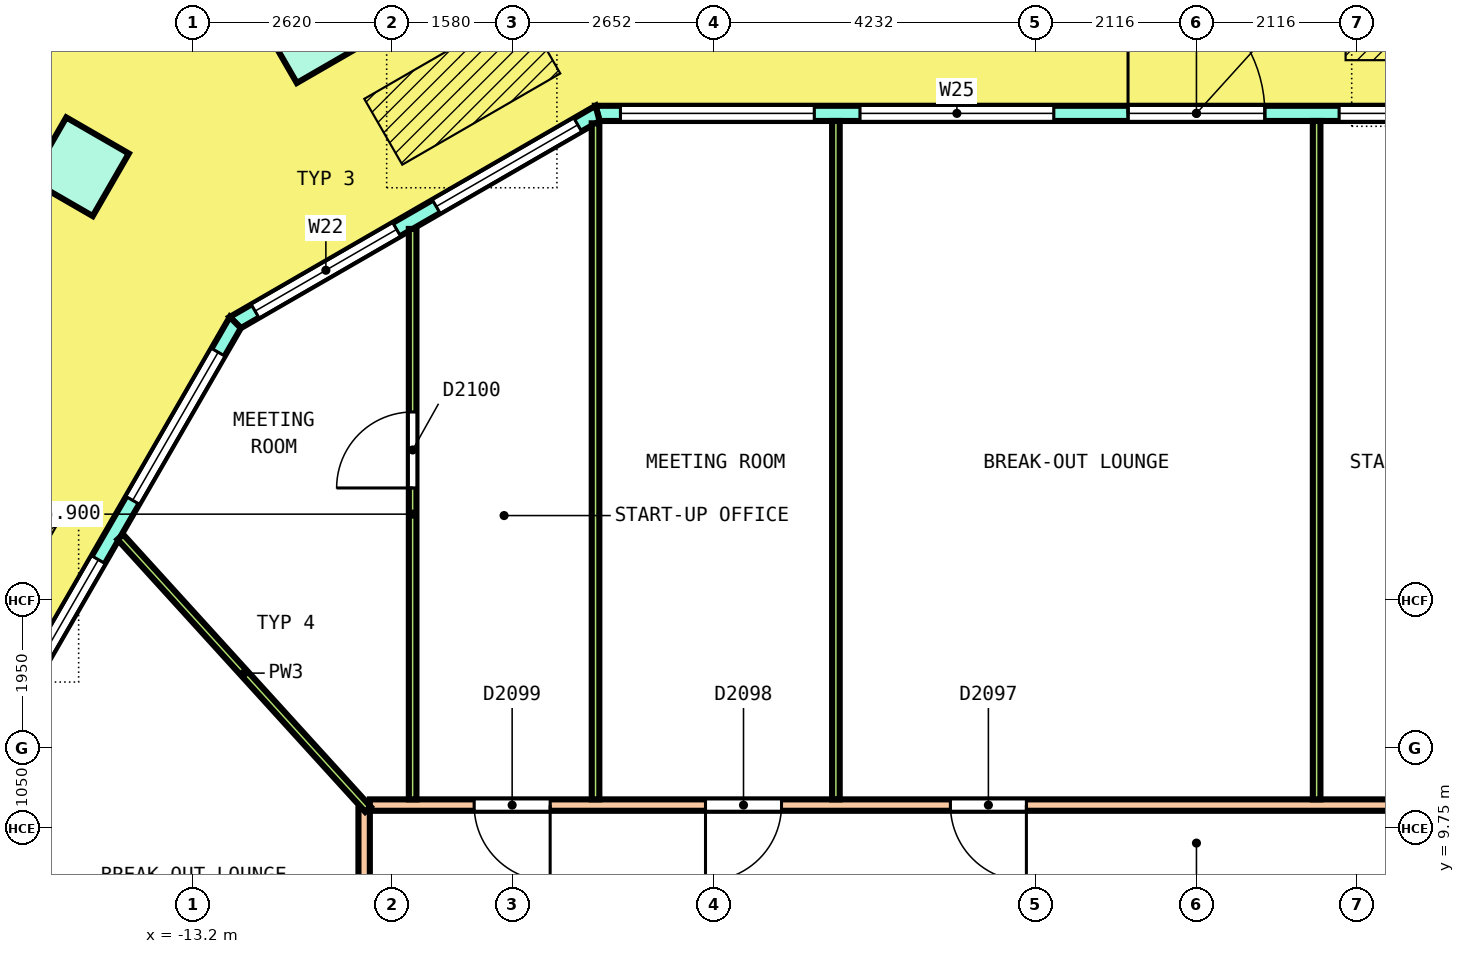
"""IFC4 building model, lengths in metres.
Left out: names, types, materials, properties, quantities, classifications, styles, units other than length and angle.
Written with IfcOpenShell. Run it as: python <this file> out.ifc"""

import sys

from ifc_helpers import new_model, si_unit, direction, frame, frame_2d, origin, origin_2d, place, context, subcontext, project, spatial, polyline, rectangle, outline, extrude, element, fill, save


model = new_model("IFC4")
c1 = context("Model", 3, precision=1e-05, world=origin(), true_north=direction((0.0, 1.0)))
c2 = subcontext(c1, "Body", "Model", "MODEL_VIEW")
j1 = project(units=[si_unit("LENGTHUNIT", "METRE"), si_unit("PLANEANGLEUNIT", "RADIAN")], contexts=[c1])
p1 = place(None, origin())
s1 = spatial("IfcSite", under=j1, at=p1, CompositionType="ELEMENT")
p2 = place(p1, origin())
s2 = spatial("IfcBuilding", under=s1, at=p2, CompositionType="ELEMENT")
p3 = place(p2, frame((0.0, 0.0, 263.0)))
s3 = spatial("IfcBuildingStorey", under=s2, at=p3, CompositionType="ELEMENT", Elevation=263.0)
for number, where, z_axis, x_axis in (
    (1, (-11.662, 20.199, 0.0), (-0.036, 0.0, 0.999), (-0.865, -0.5, -0.031)),
    (2, (-14.695, 18.448, 0.0), (-0.036, 0.0, 0.999), (-0.499, -0.866, -0.018)),
):
    element("IfcColumn", number, at=place(p3, frame(where, z_axis=z_axis, x_axis=x_axis)), inside=s3, PredefinedType="COLUMN", context=c2, shape_type="SweptSolid", body=[
        extrude(rectangle(XDim=0.95, YDim=0.95, at=origin_2d()), origin(), (0.0, 0.0, 1.0), 3.652),
    ])
p4 = place(p3, frame((7.879, 19.15, 0.0), z_axis=(0.0, 0.0, 1.0), x_axis=(-1.0, 0.0, 0.0)))
e3 = element("IfcWall", 3, at=p4, inside=s3, PredefinedType="SOLIDWALL", context=c2, shape_type="SweptSolid", body=[
    extrude(outline(polyline([(-0.027, -0.1), (1.027, -0.1), (2.081, -0.1), (3.135, -0.1), (4.189, -0.1), (5.244, -0.1), (6.298, -0.1), (7.352, -0.1), (8.406, -0.1), (9.46, -0.1), (10.514, -0.1), (11.568, -0.1), (12.622, -0.1), (13.677, -0.1), (14.73, -0.1), (15.785, -0.1), (15.731, 0.1), (14.684, 0.1), (13.637, 0.1), (12.59, 0.1), (11.543, 0.1), (10.496, 0.1), (9.449, 0.1), (8.402, 0.1), (7.355, 0.1), (6.309, 0.1), (5.261, 0.1), (4.215, 0.1), (3.168, 0.1), (2.121, 0.1), (1.074, 0.1), (0.027, 0.1), (-0.027, -0.1)])), origin(), (0.0, 0.0, 1.0), 3.7),
])
p5 = place(p4, frame((0.301, 0.0, 0.1)))
e4 = element("IfcOpeningElement", 4, at=p5, cuts=e3, PredefinedType="OPENING", context=c2, shape_type="SweptSolid", body=[
    extrude(rectangle(XDim=2.55, YDim=2.75, at=frame_2d((1.275, 1.375))), frame((0.0, 0.11, 0.0), z_axis=(0.0, -1.0, 0.0), x_axis=(1.0, 0.0, 0.0)), (0.0, 0.0, 1.0), 0.22),
])
p6 = place(p4, frame((3.452, 0.0, 0.1)))
e5 = element("IfcOpeningElement", 5, at=p6, cuts=e3, PredefinedType="OPENING", context=c2, shape_type="SweptSolid", body=[
    extrude(rectangle(XDim=2.55, YDim=2.75, at=frame_2d((1.275, 1.375))), frame((0.0, 0.11, 0.0), z_axis=(0.0, -1.0, 0.0), x_axis=(1.0, 0.0, 0.0)), (0.0, 0.0, 1.0), 0.22),
])
p7 = place(p4, frame((6.979, 0.0, 0.0)))
e6 = element("IfcOpeningElement", 6, at=p7, cuts=e3, PredefinedType="OPENING", context=c2, shape_type="SweptSolid", body=[
    extrude(rectangle(XDim=1.8, YDim=2.4, at=frame_2d((0.9, 1.2))), frame((0.0, 0.11, 0.0), z_axis=(0.0, -1.0, 0.0), x_axis=(1.0, 0.0, 0.0)), (0.0, 0.0, 1.0), 0.22),
])
p8 = place(p4, frame((6.979, 0.0, 2.55)))
e7 = element("IfcOpeningElement", 7, at=p8, cuts=e3, PredefinedType="OPENING", context=c2, shape_type="SweptSolid", body=[
    extrude(rectangle(XDim=1.8, YDim=0.3, at=frame_2d((0.9, 0.15))), frame((0.0, 0.11, 0.0), z_axis=(0.0, -1.0, 0.0), x_axis=(1.0, 0.0, 0.0)), (0.0, 0.0, 1.0), 0.22),
])
p9 = place(p4, frame((9.755, 0.0, 0.1)))
e8 = element("IfcOpeningElement", 8, at=p9, cuts=e3, PredefinedType="OPENING", context=c2, shape_type="SweptSolid", body=[
    extrude(rectangle(XDim=2.55, YDim=2.75, at=frame_2d((1.275, 1.375))), frame((0.0, 0.11, 0.0), z_axis=(0.0, -1.0, 0.0), x_axis=(1.0, 0.0, 0.0)), (0.0, 0.0, 1.0), 0.22),
])
p10 = place(p4, frame((12.907, 0.0, 0.1)))
e9 = element("IfcOpeningElement", 9, at=p10, cuts=e3, PredefinedType="OPENING", context=c2, shape_type="SweptSolid", body=[
    extrude(rectangle(XDim=2.55, YDim=2.75, at=frame_2d((1.275, 1.375))), frame((0.0, 0.11, 0.0), z_axis=(0.0, -1.0, 0.0), x_axis=(1.0, 0.0, 0.0)), (0.0, 0.0, 1.0), 0.22),
])
p11 = place(p3, frame((-7.879, 19.15, 0.0), z_axis=(0.0, 0.0, 1.0), x_axis=(-0.866026017613, -0.499998936816, 0.0)))
e10 = element("IfcWall", 10, at=p11, inside=s3, PredefinedType="SOLIDWALL", context=c2, shape_type="SweptSolid", body=[
    extrude(outline(polyline([(-0.027, -0.1), (1.084, -0.1), (2.196, -0.1), (3.307, -0.1), (4.419, -0.1), (5.53, -0.1), (5.477, 0.1), (4.387, 0.1), (3.297, 0.1), (2.207, 0.1), (1.117, 0.1), (0.027, 0.1), (-0.027, -0.1)])), origin(), (0.0, 0.0, 1.0), 3.7),
])
p12 = place(p11, frame((0.301, 0.0, 0.1)))
e11 = element("IfcOpeningElement", 11, at=p12, cuts=e10, PredefinedType="OPENING", context=c2, shape_type="SweptSolid", body=[
    extrude(rectangle(XDim=2.15, YDim=2.75, at=frame_2d((1.075, 1.375))), frame((0.0, 0.11, 0.0), z_axis=(0.0, -1.0, 0.0), x_axis=(1.0, 0.0, 0.0)), (0.0, 0.0, 1.0), 0.22),
])
p13 = place(p11, frame((3.052, 0.0, 0.1)))
e12 = element("IfcOpeningElement", 12, at=p13, cuts=e10, PredefinedType="OPENING", context=c2, shape_type="SweptSolid", body=[
    extrude(rectangle(XDim=2.15, YDim=2.75, at=frame_2d((1.075, 1.375))), frame((0.0, 0.11, 0.0), z_axis=(0.0, -1.0, 0.0), x_axis=(1.0, 0.0, 0.0)), (0.0, 0.0, 1.0), 0.22),
])
p14 = place(p3, frame((-12.645, 16.398, 0.0), z_axis=(0.0, 0.0, 1.0), x_axis=(-0.499993368965, -0.86602923218, 0.0)))
e13 = element("IfcWall", 13, at=p14, inside=s3, PredefinedType="SOLIDWALL", context=c2, shape_type="SweptSolid", body=[
    extrude(outline(polyline([(-0.027, -0.1), (1.027, -0.1), (2.081, -0.1), (3.135, -0.1), (4.189, -0.1), (5.244, -0.1), (6.298, -0.1), (7.352, -0.1), (8.406, -0.1), (9.46, -0.1), (10.514, -0.1), (11.568, -0.1), (12.622, -0.1), (13.676, -0.1), (14.73, -0.1), (15.784, -0.1), (15.731, 0.1), (14.684, 0.1), (13.637, 0.1), (12.59, 0.1), (11.543, 0.1), (10.496, 0.1), (9.449, 0.1), (8.402, 0.1), (7.355, 0.1), (6.308, 0.1), (5.261, 0.1), (4.215, 0.1), (3.168, 0.1), (2.121, 0.1), (1.074, 0.1), (0.027, 0.1), (-0.027, -0.1)])), origin(), (0.0, 0.0, 1.0), 3.7),
])
p15 = place(p14, frame((0.451, 0.0, 0.1)))
e14 = element("IfcOpeningElement", 14, at=p15, cuts=e13, PredefinedType="OPENING", context=c2, shape_type="SweptSolid", body=[
    extrude(rectangle(XDim=2.25, YDim=2.75, at=frame_2d((1.125, 1.375))), frame((0.0, 0.11, 0.0), z_axis=(0.0, -1.0, 0.0), x_axis=(1.0, 0.0, 0.0)), (0.0, 0.0, 1.0), 0.22),
])
p16 = place(p14, frame((3.602, 0.0, 0.1)))
e15 = element("IfcOpeningElement", 15, at=p16, cuts=e13, PredefinedType="OPENING", context=c2, shape_type="SweptSolid", body=[
    extrude(rectangle(XDim=2.25, YDim=2.75, at=frame_2d((1.125, 1.375))), frame((0.0, 0.11, 0.0), z_axis=(0.0, -1.0, 0.0), x_axis=(1.0, 0.0, 0.0)), (0.0, 0.0, 1.0), 0.22),
])
p17 = place(p14, frame((6.979, 0.0, 0.0)))
e16 = element("IfcOpeningElement", 16, at=p17, cuts=e13, PredefinedType="OPENING", context=c2, shape_type="SweptSolid", body=[
    extrude(rectangle(XDim=1.8, YDim=2.4, at=frame_2d((0.9, 1.2))), frame((0.0, 0.11, 0.0), z_axis=(0.0, -1.0, 0.0), x_axis=(1.0, 0.0, 0.0)), (0.0, 0.0, 1.0), 0.22),
])
p18 = place(p14, frame((6.979, 0.0, 2.55)))
e17 = element("IfcOpeningElement", 17, at=p18, cuts=e13, PredefinedType="OPENING", context=c2, shape_type="SweptSolid", body=[
    extrude(rectangle(XDim=1.8, YDim=0.3, at=frame_2d((0.9, 0.15))), frame((0.0, 0.11, 0.0), z_axis=(0.0, -1.0, 0.0), x_axis=(1.0, 0.0, 0.0)), (0.0, 0.0, 1.0), 0.22),
])
p19 = place(p14, frame((9.906, 0.0, 0.1)))
e18 = element("IfcOpeningElement", 18, at=p19, cuts=e13, PredefinedType="OPENING", context=c2, shape_type="SweptSolid", body=[
    extrude(rectangle(XDim=2.25, YDim=2.75, at=frame_2d((1.125, 1.375))), frame((0.0, 0.11, 0.0), z_axis=(0.0, -1.0, 0.0), x_axis=(1.0, 0.0, 0.0)), (0.0, 0.0, 1.0), 0.22),
])
p20 = place(p14, frame((13.057, 0.0, 0.1)))
e19 = element("IfcOpeningElement", 19, at=p20, cuts=e13, PredefinedType="OPENING", context=c2, shape_type="SweptSolid", body=[
    extrude(rectangle(XDim=2.25, YDim=2.75, at=frame_2d((1.125, 1.375))), frame((0.0, 0.11, 0.0), z_axis=(0.0, -1.0, 0.0), x_axis=(1.0, 0.0, 0.0)), (0.0, 0.0, 1.0), 0.22),
])
p21 = place(p3, frame((-10.875, 10.05, 0.0), z_axis=(0.0, 0.0, 1.0), x_axis=(1.0, 0.0, 0.0)))
e20 = element("IfcWall", 20, at=p21, inside=s3, PredefinedType="PARTITIONING", context=c2, shape_type="SweptSolid", body=[
    extrude(rectangle(XDim=21.775, YDim=0.15, at=frame_2d((10.887, 0.0))), origin(), (0.0, 0.0, 1.0), 2.9),
])
p22 = place(p21, frame((16.885, 0.0, 0.0)))
e21 = element("IfcOpeningElement", 21, at=p22, cuts=e20, PredefinedType="OPENING", context=c2, shape_type="SweptSolid", body=[
    extrude(rectangle(XDim=1.2, YDim=2.1, at=frame_2d((0.6, 1.05))), frame((0.0, 0.085, 0.0), z_axis=(0.0, -1.0, 0.0), x_axis=(1.0, 0.0, 0.0)), (0.0, 0.0, 1.0), 0.17),
])
p23 = place(p21, frame((13.903, 0.0, 0.0)))
e22 = element("IfcOpeningElement", 22, at=p23, cuts=e20, PredefinedType="OPENING", context=c2, shape_type="SweptSolid", body=[
    extrude(rectangle(XDim=1.0, YDim=2.1, at=frame_2d((0.5, 1.05))), frame((0.0, 0.085, 0.0), z_axis=(0.0, -1.0, 0.0), x_axis=(1.0, 0.0, 0.0)), (0.0, 0.0, 1.0), 0.17),
])
p24 = place(p21, frame((7.638, 0.0, 0.0)))
e23 = element("IfcOpeningElement", 23, at=p24, cuts=e20, PredefinedType="OPENING", context=c2, shape_type="SweptSolid", body=[
    extrude(rectangle(XDim=1.0, YDim=2.1, at=frame_2d((0.5, 1.05))), frame((0.0, 0.085, 0.0), z_axis=(0.0, -1.0, 0.0), x_axis=(1.0, 0.0, 0.0)), (0.0, 0.0, 1.0), 0.17),
])
p25 = place(p21, frame((4.416, 0.0, 0.0)))
e24 = element("IfcOpeningElement", 24, at=p25, cuts=e20, PredefinedType="OPENING", context=c2, shape_type="SweptSolid", body=[
    extrude(rectangle(XDim=1.0, YDim=2.1, at=frame_2d((0.5, 1.05))), frame((0.0, 0.085, 0.0), z_axis=(0.0, -1.0, 0.0), x_axis=(1.0, 0.0, 0.0)), (0.0, 0.0, 1.0), 0.17),
])
p26 = place(p21, frame((1.372, 0.0, 0.0)))
e25 = element("IfcOpeningElement", 25, at=p26, cuts=e20, PredefinedType="OPENING", context=c2, shape_type="SweptSolid", body=[
    extrude(rectangle(XDim=1.0, YDim=2.1, at=frame_2d((0.5, 1.05))), frame((0.0, 0.085, 0.0), z_axis=(0.0, -1.0, 0.0), x_axis=(1.0, 0.0, 0.0)), (0.0, 0.0, 1.0), 0.17),
])
p27 = place(p3, frame((-10.95, -7.025, 0.0), z_axis=(0.0, 0.0, 1.0), x_axis=(0.0, 1.0, 0.0)))
e26 = element("IfcWall", 26, at=p27, inside=s3, PredefinedType="PARTITIONING", context=c2, shape_type="SweptSolid", body=[
    extrude(rectangle(XDim=17.025, YDim=0.15, at=frame_2d((8.512, 0.0))), origin(), (0.0, 0.0, 1.0), 2.9),
])
p28 = place(p27, frame((13.256, 0.0, 0.0)))
e27 = element("IfcOpeningElement", 27, at=p28, cuts=e26, PredefinedType="OPENING", context=c2, shape_type="SweptSolid", body=[
    extrude(rectangle(XDim=1.0, YDim=2.1, at=frame_2d((0.5, 1.05))), frame((0.0, 0.085, 0.0), z_axis=(0.0, -1.0, 0.0), x_axis=(1.0, 0.0, 0.0)), (0.0, 0.0, 1.0), 0.17),
])
p29 = place(p27, frame((8.754, 0.0, 0.0)))
e28 = element("IfcOpeningElement", 28, at=p29, cuts=e26, PredefinedType="OPENING", context=c2, shape_type="SweptSolid", body=[
    extrude(rectangle(XDim=1.2, YDim=2.1, at=frame_2d((0.6, 1.05))), frame((0.0, 0.085, 0.0), z_axis=(0.0, -1.0, 0.0), x_axis=(1.0, 0.0, 0.0)), (0.0, 0.0, 1.0), 0.17),
])
for number, where, z_axis, x_axis in (
    (29, (1.581, 10.125, 0.0), (0.0, 0.0, 1.0), (0.0, 1.0, 0.0)),
    (30, (-4.743, 10.125, 0.0), (0.0, 0.0, 1.0), (0.0, 1.0, 0.0)),
):
    element("IfcWall", number, at=place(p3, frame(where, z_axis=z_axis, x_axis=x_axis)), inside=s3, PredefinedType="PARTITIONING", context=c2, shape_type="SweptSolid", body=[
        extrude(rectangle(XDim=8.925, YDim=0.1, at=frame_2d((4.462, 0.0))), origin(), (0.0, 0.0, 1.0), 2.9),
    ])
p30 = place(p3, frame((-7.906, 10.125, 0.0), z_axis=(0.0, 0.0, 1.0), x_axis=(0.0, 1.0, 0.0)))
e31 = element("IfcWall", 31, at=p30, inside=s3, PredefinedType="PARTITIONING", context=c2, shape_type="SweptSolid", body=[
    extrude(rectangle(XDim=8.894, YDim=0.1, at=frame_2d((4.447, 0.0))), origin(), (0.0, 0.0, 1.0), 2.9),
])
p31 = place(p3, frame((-10.312, 10.125, 0.0), z_axis=(0.0, 0.0, 1.0), x_axis=(0.0, 1.0, 0.0)))
e32 = element("IfcWall", 32, at=p31, inside=s3, PredefinedType="PARTITIONING", context=c2, shape_type="SweptSolid", body=[
    extrude(rectangle(XDim=7.505, YDim=0.1, at=frame_2d((3.752, 0.0))), origin(), (0.0, 0.0, 1.0), 2.9),
])
p32 = place(p31, frame((4.097, 0.0, 0.0)))
e33 = element("IfcOpeningElement", 33, at=p32, cuts=e32, PredefinedType="OPENING", context=c2, shape_type="SweptSolid", body=[
    extrude(rectangle(XDim=1.0, YDim=2.1, at=frame_2d((0.5, 1.05))), frame((0.0, 0.06, 0.0), z_axis=(0.0, -1.0, 0.0), x_axis=(1.0, 0.0, 0.0)), (0.0, 0.0, 1.0), 0.12),
])
p33 = place(p3, frame((-14.158, 13.578, 0.0), z_axis=(0.0, 0.0, 1.0), x_axis=(0.672790707388, -0.739832862241, 0.0)))
e34 = element("IfcWall", 34, at=p33, inside=s3, PredefinedType="PARTITIONING", context=c2, shape_type="SweptSolid", body=[
    extrude(rectangle(XDim=4.843, YDim=0.1, at=frame_2d((2.422, 0.0))), origin(), (0.0, 0.0, 1.0), 2.9),
])
p34 = place(p6, origin())
e35 = element("IfcWindow", 35, at=p34, inside=s3, PartitioningType="SINGLE_PANEL", PredefinedType="WINDOW", context=c2, shape_type="SweptSolid", body=[
    extrude(rectangle(XDim=2.55, YDim=2.75, at=frame_2d((1.275, 1.375))), frame((0.0, 0.03, 0.0), z_axis=(0.0, -1.0, 0.0), x_axis=(1.0, 0.0, 0.0)), (0.0, 0.0, 1.0), 0.06),
])
fill(e5, e35)
p35 = place(p7, origin())
e36 = element("IfcDoor", 36, at=p35, inside=s3, OperationType="DOUBLE_DOOR_SINGLE_SWING", PredefinedType="DOOR", context=c2, shape_type="SweptSolid", body=[
    extrude(rectangle(XDim=1.8, YDim=2.4, at=frame_2d((0.9, 1.2))), frame((0.0, 0.025, 0.0), z_axis=(0.0, -1.0, 0.0), x_axis=(1.0, 0.0, 0.0)), (0.0, 0.0, 1.0), 0.05),
])
fill(e6, e36)
p36 = place(p8, origin())
e37 = element("IfcWindow", 37, at=p36, inside=s3, PartitioningType="SINGLE_PANEL", PredefinedType="WINDOW", context=c2, shape_type="SweptSolid", body=[
    extrude(rectangle(XDim=1.8, YDim=0.3, at=frame_2d((0.9, 0.15))), frame((0.0, 0.03, 0.0), z_axis=(0.0, -1.0, 0.0), x_axis=(1.0, 0.0, 0.0)), (0.0, 0.0, 1.0), 0.06),
])
fill(e7, e37)
p37 = place(p9, origin())
e38 = element("IfcWindow", 38, at=p37, inside=s3, PartitioningType="SINGLE_PANEL", PredefinedType="WINDOW", context=c2, shape_type="SweptSolid", body=[
    extrude(rectangle(XDim=2.55, YDim=2.75, at=frame_2d((1.275, 1.375))), frame((0.0, 0.03, 0.0), z_axis=(0.0, -1.0, 0.0), x_axis=(1.0, 0.0, 0.0)), (0.0, 0.0, 1.0), 0.06),
])
fill(e8, e38)
p38 = place(p10, origin())
e39 = element("IfcWindow", 39, at=p38, inside=s3, PartitioningType="SINGLE_PANEL", PredefinedType="WINDOW", context=c2, shape_type="SweptSolid", body=[
    extrude(rectangle(XDim=2.55, YDim=2.75, at=frame_2d((1.275, 1.375))), frame((0.0, 0.03, 0.0), z_axis=(0.0, -1.0, 0.0), x_axis=(1.0, 0.0, 0.0)), (0.0, 0.0, 1.0), 0.06),
])
fill(e9, e39)
p39 = place(p12, origin())
e40 = element("IfcWindow", 40, at=p39, inside=s3, PartitioningType="SINGLE_PANEL", PredefinedType="WINDOW", context=c2, shape_type="SweptSolid", body=[
    extrude(rectangle(XDim=2.15, YDim=2.75, at=frame_2d((1.075, 1.375))), frame((0.0, 0.03, 0.0), z_axis=(0.0, -1.0, 0.0), x_axis=(1.0, 0.0, 0.0)), (0.0, 0.0, 1.0), 0.06),
])
fill(e11, e40)
p40 = place(p13, origin())
e41 = element("IfcWindow", 41, at=p40, inside=s3, PartitioningType="SINGLE_PANEL", PredefinedType="WINDOW", context=c2, shape_type="SweptSolid", body=[
    extrude(rectangle(XDim=2.15, YDim=2.75, at=frame_2d((1.075, 1.375))), frame((0.0, 0.03, 0.0), z_axis=(0.0, -1.0, 0.0), x_axis=(1.0, 0.0, 0.0)), (0.0, 0.0, 1.0), 0.06),
])
fill(e12, e41)
p41 = place(p15, origin())
e42 = element("IfcWindow", 42, at=p41, inside=s3, PartitioningType="SINGLE_PANEL", PredefinedType="WINDOW", context=c2, shape_type="SweptSolid", body=[
    extrude(rectangle(XDim=2.25, YDim=2.75, at=frame_2d((1.125, 1.375))), frame((0.0, 0.03, 0.0), z_axis=(0.0, -1.0, 0.0), x_axis=(1.0, 0.0, 0.0)), (0.0, 0.0, 1.0), 0.06),
])
fill(e14, e42)
p42 = place(p16, origin())
e43 = element("IfcWindow", 43, at=p42, inside=s3, PartitioningType="SINGLE_PANEL", PredefinedType="WINDOW", context=c2, shape_type="SweptSolid", body=[
    extrude(rectangle(XDim=2.25, YDim=2.75, at=frame_2d((1.125, 1.375))), frame((0.0, 0.03, 0.0), z_axis=(0.0, -1.0, 0.0), x_axis=(1.0, 0.0, 0.0)), (0.0, 0.0, 1.0), 0.06),
])
fill(e15, e43)
p43 = place(p24, origin())
e44 = element("IfcDoor", 44, at=p43, inside=s3, OperationType="SINGLE_SWING_RIGHT", PredefinedType="DOOR", context=c2, shape_type="SweptSolid", body=[
    extrude(rectangle(XDim=1.0, YDim=2.1, at=frame_2d((0.5, 1.05))), frame((0.0, 0.025, 0.0), z_axis=(0.0, -1.0, 0.0), x_axis=(1.0, 0.0, 0.0)), (0.0, 0.0, 1.0), 0.05),
])
fill(e23, e44)
p44 = place(p25, origin())
e45 = element("IfcDoor", 45, at=p44, inside=s3, OperationType="SINGLE_SWING_RIGHT", PredefinedType="DOOR", context=c2, shape_type="SweptSolid", body=[
    extrude(rectangle(XDim=1.0, YDim=2.1, at=frame_2d((0.5, 1.05))), frame((0.0, 0.025, 0.0), z_axis=(0.0, -1.0, 0.0), x_axis=(1.0, 0.0, 0.0)), (0.0, 0.0, 1.0), 0.05),
])
fill(e24, e45)
p45 = place(p26, origin())
e46 = element("IfcDoor", 46, at=p45, inside=s3, OperationType="SINGLE_SWING_RIGHT", PredefinedType="DOOR", context=c2, shape_type="SweptSolid", body=[
    extrude(rectangle(XDim=1.0, YDim=2.1, at=frame_2d((0.5, 1.05))), frame((0.0, 0.025, 0.0), z_axis=(0.0, -1.0, 0.0), x_axis=(1.0, 0.0, 0.0)), (0.0, 0.0, 1.0), 0.05),
])
fill(e25, e46)
p46 = place(p32, origin())
e47 = element("IfcDoor", 47, at=p46, inside=s3, OperationType="SINGLE_SWING_LEFT", PredefinedType="DOOR", context=c2, shape_type="SweptSolid", body=[
    extrude(rectangle(XDim=1.0, YDim=2.1, at=frame_2d((0.5, 1.05))), frame((0.0, 0.025, 0.0), z_axis=(0.0, -1.0, 0.0), x_axis=(1.0, 0.0, 0.0)), (0.0, 0.0, 1.0), 0.05),
])
fill(e33, e47)
save(model, sys.argv[1])
